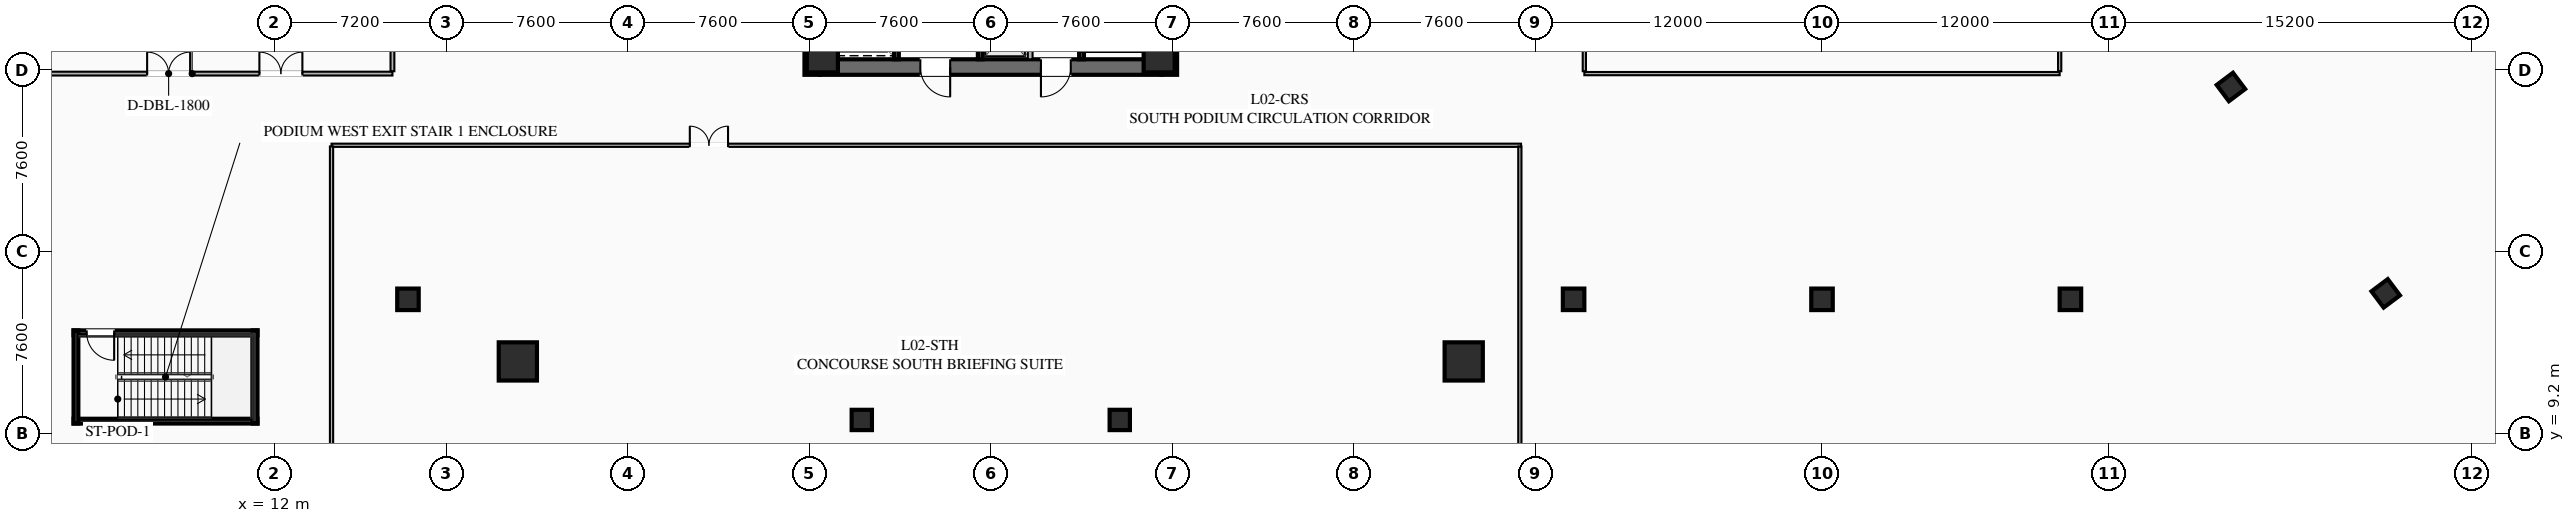
"""IFC4 building model, lengths in metres.
Left out: names, types, materials, properties, quantities, classifications, styles, units other than length and angle.
Written with IfcOpenShell. Run it as: python <this file> out.ifc"""

import sys

from ifc_helpers import new_model, si_unit, direction, frame, frame_2d, origin, origin_2d, place, context, subcontext, project, spatial, rectangle, hollow_rectangle, extrude, element, fill, save


model = new_model("IFC4")
c1 = context("Model", 3, precision=1e-05, world=origin(), true_north=direction((0.0, 1.0)))
c2 = subcontext(c1, "Body", "Model", "MODEL_VIEW")
j1 = project(units=[si_unit("LENGTHUNIT", "METRE"), si_unit("PLANEANGLEUNIT", "RADIAN")], contexts=[c1])
p1 = place(None, origin())
s1 = spatial("IfcSite", under=j1, at=p1, CompositionType="ELEMENT")
p2 = place(p1, origin())
s2 = spatial("IfcBuilding", under=s1, at=p2, CompositionType="ELEMENT")
p3 = place(p2, frame((0.0, 0.0, 10.2)))
s3 = spatial("IfcBuildingStorey", under=s2, at=p3, CompositionType="ELEMENT", Elevation=10.2)
for number, where, z_axis, x_axis in (
    (1, (34.525, 24.2, 0.0), (0.0, 0.0, 1.0), (0.0, 1.0, 0.0)),
    (2, (49.475, 39.8, 0.0), (0.0, 0.0, 1.0), (0.0, -1.0, 0.0)),
):
    element("IfcWall", number, at=place(p3, frame(where, z_axis=z_axis, x_axis=x_axis)), inside=s3, PredefinedType="SHEAR", context=c2, shape_type="SweptSolid", body=[
        extrude(rectangle(XDim=15.6, YDim=0.65, at=frame_2d((7.8, 0.0))), origin(), (0.0, 0.0, 1.0), 5.4),
    ])
p4 = place(p3, frame((49.15, 24.525, 0.0), z_axis=(0.0, 0.0, 1.0), x_axis=(-1.0, 0.0, 0.0)))
e3 = element("IfcWall", 3, at=p4, inside=s3, PredefinedType="SHEAR", context=c2, shape_type="SweptSolid", body=[
    extrude(rectangle(XDim=14.3, YDim=0.65, at=frame_2d((7.15, 0.0))), origin(), (0.0, 0.0, 1.0), 5.4),
])
p5 = place(p4, frame((8.85, 0.0, 0.0)))
e4 = element("IfcOpeningElement", 4, at=p5, cuts=e3, PredefinedType="OPENING", context=c2, shape_type="SweptSolid", body=[
    extrude(rectangle(XDim=1.25, YDim=2.25, at=frame_2d((0.625, 1.125))), frame((0.0, 0.335, 0.0), z_axis=(0.0, -1.0, 0.0), x_axis=(1.0, 0.0, 0.0)), (0.0, 0.0, 1.0), 0.67),
])
p6 = place(p4, frame((3.8, 0.0, 0.0)))
e5 = element("IfcOpeningElement", 5, at=p6, cuts=e3, PredefinedType="OPENING", context=c2, shape_type="SweptSolid", body=[
    extrude(rectangle(XDim=1.25, YDim=2.25, at=frame_2d((0.625, 1.125))), frame((0.0, 0.335, 0.0), z_axis=(0.0, -1.0, 0.0), x_axis=(1.0, 0.0, 0.0)), (0.0, 0.0, 1.0), 0.67),
])
for number, where, z_axis, x_axis in (
    (6, (34.95, 24.95, 0.0), (0.0, 0.0, 1.0), (1.0, 0.0, 0.0)),
    (7, (49.05, 24.95, 0.0), (0.0, 0.0, 1.0), (1.0, 0.0, 0.0)),
):
    element("IfcColumn", number, at=place(p3, frame(where, z_axis=z_axis, x_axis=x_axis)), inside=s3, PredefinedType="COLUMN", context=c2, shape_type="SweptSolid", body=[
        extrude(hollow_rectangle(XDim=1.3, YDim=1.3, WallThickness=0.05, at=origin_2d()), origin(), (0.0, 0.0, 1.0), 5.14),
    ])
for number, where, z_axis, x_axis in (
    (8, (22.2, 12.2, 0.0), (0.0, 0.0, 1.0), (1.0, 0.0, 0.0)),
    (9, (61.8, 12.2, 0.0), (0.0, 0.0, 1.0), (1.0, 0.0, 0.0)),
):
    element("IfcColumn", number, at=place(p3, frame(where, z_axis=z_axis, x_axis=x_axis)), inside=s3, PredefinedType="COLUMN", context=c2, shape_type="SweptSolid", body=[
        extrude(hollow_rectangle(XDim=1.6, YDim=1.6, WallThickness=0.06, at=origin_2d()), origin(), (0.0, 0.0, 1.0), 5.14),
    ])
for number, where, z_axis, x_axis in (
    (10, (36.6, 9.75, 0.0), (0.0, 0.0, 1.0), (1.0, 0.0, 0.0)),
    (11, (47.4, 9.75, 0.0), (0.0, 0.0, 1.0), (1.0, 0.0, 0.0)),
):
    element("IfcColumn", number, at=place(p3, frame(where, z_axis=z_axis, x_axis=x_axis)), inside=s3, PredefinedType="COLUMN", context=c2, shape_type="SweptSolid", body=[
        extrude(hollow_rectangle(XDim=0.85, YDim=0.85, WallThickness=0.035, at=origin_2d()), origin(), (0.0, 0.0, 1.0), 5.14),
    ])
p7 = place(p3, frame((112.476, 21.107, 0.0), z_axis=(0.0, 0.0, 1.0), x_axis=(-0.600005007985, 0.799996243986, 0.0)))
e12 = element("IfcWall", 12, at=p7, inside=s3, PredefinedType="SHEAR", context=c2, shape_type="SweptSolid", body=[
    extrude(rectangle(XDim=15.6, YDim=0.65, at=frame_2d((7.8, 0.0))), origin(), (0.0, 0.0, 1.0), 5.4),
])
for number, where, z_axis, x_axis in (
    (13, (93.92, 23.69, 0.0), (0.0, 0.0, 1.0), (0.8, 0.6, 0.0)),
    (14, (100.4, 15.05, 0.0), (0.0, 0.0, 1.0), (0.8, 0.6, 0.0)),
):
    element("IfcColumn", number, at=place(p3, frame(where, z_axis=z_axis, x_axis=x_axis)), inside=s3, PredefinedType="COLUMN", context=c2, shape_type="SweptSolid", body=[
        extrude(hollow_rectangle(XDim=0.85, YDim=0.85, WallThickness=0.035, at=origin_2d()), origin(), (0.0, 0.0, 1.0), 5.14),
    ])
for number, where, z_axis, x_axis in (
    (15, (17.6, 14.8, 0.0), (0.0, 0.0, 1.0), (1.0, 0.0, 0.0)),
    (16, (66.4, 14.8, 0.0), (0.0, 0.0, 1.0), (1.0, 0.0, 0.0)),
    (17, (76.8, 14.8, 0.0), (0.0, 0.0, 1.0), (1.0, 0.0, 0.0)),
    (18, (87.2, 14.8, 0.0), (0.0, 0.0, 1.0), (1.0, 0.0, 0.0)),
):
    element("IfcColumn", number, at=place(p3, frame(where, z_axis=z_axis, x_axis=x_axis)), inside=s3, PredefinedType="COLUMN", context=c2, shape_type="SweptSolid", body=[
        extrude(rectangle(XDim=0.9, YDim=0.9, at=origin_2d()), origin(), (0.0, 0.0, 1.0), 5.14),
    ])
p8 = place(p3, frame((45.8, 32.8, 0.0), z_axis=(0.0, 0.0, 1.0), x_axis=(0.0, -1.0, 0.0)))
e19 = element("IfcWall", 19, at=p8, inside=s3, PredefinedType="SHEAR", context=c2, shape_type="SweptSolid", body=[
    extrude(rectangle(XDim=7.95, YDim=0.2, at=frame_2d((3.975, 0.0))), origin(), (0.0, 0.0, 1.0), 5.14),
])
p9 = place(p8, frame((0.45, 0.0, 0.0)))
e20 = element("IfcOpeningElement", 20, at=p9, cuts=e19, PredefinedType="OPENING", context=c2, shape_type="SweptSolid", body=[
    extrude(rectangle(XDim=1.15, YDim=2.2, at=frame_2d((0.575, 1.1))), frame((0.0, 0.11, 0.0), z_axis=(0.0, -1.0, 0.0), x_axis=(1.0, 0.0, 0.0)), (0.0, 0.0, 1.0), 0.22),
])
p10 = place(p3, frame((41.56, 24.85, 0.0), z_axis=(0.0, 0.0, 1.0), x_axis=(0.0, 1.0, 0.0)))
e21 = element("IfcWall", 21, at=p10, inside=s3, PredefinedType="SHEAR", context=c2, shape_type="SweptSolid", body=[
    extrude(rectangle(XDim=14.3, YDim=0.2, at=frame_2d((7.15, 0.0))), origin(), (0.0, 0.0, 1.0), 5.14),
])
p11 = place(p3, frame((38.05, 24.85, 0.0), z_axis=(0.0, 0.0, 1.0), x_axis=(0.0, 1.0, 0.0)))
e22 = element("IfcWall", 22, at=p11, inside=s3, PredefinedType="SHEAR", context=c2, shape_type="SweptSolid", body=[
    extrude(rectangle(XDim=6.35, YDim=0.2, at=frame_2d((3.175, 0.0))), origin(), (0.0, 0.0, 1.0), 5.14),
])
p12 = place(p11, frame((4.775, 0.0, 0.0)))
e23 = element("IfcOpeningElement", 23, at=p12, cuts=e22, PredefinedType="OPENING", context=c2, shape_type="SweptSolid", body=[
    extrude(rectangle(XDim=1.3, YDim=2.25, at=frame_2d((0.65, 1.125))), frame((0.0, 0.11, 0.0), z_axis=(0.0, -1.0, 0.0), x_axis=(1.0, 0.0, 0.0)), (0.0, 0.0, 1.0), 0.22),
])
p13 = place(p11, frame((2.775, 0.0, 0.0)))
e24 = element("IfcOpeningElement", 24, at=p13, cuts=e22, PredefinedType="OPENING", context=c2, shape_type="SweptSolid", body=[
    extrude(rectangle(XDim=1.3, YDim=2.25, at=frame_2d((0.65, 1.125))), frame((0.0, 0.11, 0.0), z_axis=(0.0, -1.0, 0.0), x_axis=(1.0, 0.0, 0.0)), (0.0, 0.0, 1.0), 0.22),
])
p14 = place(p11, frame((0.575, 0.0, 0.0)))
e25 = element("IfcOpeningElement", 25, at=p14, cuts=e22, PredefinedType="OPENING", context=c2, shape_type="SweptSolid", body=[
    extrude(rectangle(XDim=1.3, YDim=2.25, at=frame_2d((0.65, 1.125))), frame((0.0, 0.11, 0.0), z_axis=(0.0, -1.0, 0.0), x_axis=(1.0, 0.0, 0.0)), (0.0, 0.0, 1.0), 0.22),
])
p15 = place(p3, frame((43.65, 24.85, 0.0), z_axis=(0.0, 0.0, 1.0), x_axis=(0.0, 1.0, 0.0)))
e26 = element("IfcWall", 26, at=p15, inside=s3, PredefinedType="SOLIDWALL", context=c2, shape_type="SweptSolid", body=[
    extrude(rectangle(XDim=6.8, YDim=0.2, at=frame_2d((3.4, 0.0))), origin(), (0.0, 0.0, 1.0), 5.14),
])
p16 = place(p15, frame((0.625, 0.0, 0.0)))
e27 = element("IfcOpeningElement", 27, at=p16, cuts=e26, PredefinedType="OPENING", context=c2, shape_type="SweptSolid", body=[
    extrude(rectangle(XDim=1.1, YDim=2.2, at=frame_2d((0.55, 1.1))), frame((0.0, 0.11, 0.0), z_axis=(0.0, -1.0, 0.0), x_axis=(1.0, 0.0, 0.0)), (0.0, 0.0, 1.0), 0.22),
])
p17 = place(p15, frame((2.875, 0.0, 0.0)))
e28 = element("IfcOpeningElement", 28, at=p17, cuts=e26, PredefinedType="OPENING", context=c2, shape_type="SweptSolid", body=[
    extrude(rectangle(XDim=1.1, YDim=2.2, at=frame_2d((0.55, 1.1))), frame((0.0, 0.11, 0.0), z_axis=(0.0, -1.0, 0.0), x_axis=(1.0, 0.0, 0.0)), (0.0, 0.0, 1.0), 0.22),
])
p18 = place(p15, frame((5.125, 0.0, 0.0)))
e29 = element("IfcOpeningElement", 29, at=p18, cuts=e26, PredefinedType="OPENING", context=c2, shape_type="SweptSolid", body=[
    extrude(rectangle(XDim=1.1, YDim=2.2, at=frame_2d((0.55, 1.1))), frame((0.0, 0.11, 0.0), z_axis=(0.0, -1.0, 0.0), x_axis=(1.0, 0.0, 0.0)), (0.0, 0.0, 1.0), 0.22),
])
p19 = place(p3, frame((11.3, 13.4, 0.0), z_axis=(0.0, 0.0, 1.0), x_axis=(-1.0, 0.0, 0.0)))
e30 = element("IfcWall", 30, at=p19, inside=s3, PredefinedType="SHEAR", context=c2, shape_type="SweptSolid", body=[
    extrude(rectangle(XDim=7.7, YDim=0.2, at=frame_2d((3.85, 0.0))), origin(), (0.0, 0.0, 1.0), 5.14),
])
p20 = place(p19, frame((6.0, 0.0, 0.0)))
e31 = element("IfcOpeningElement", 31, at=p20, cuts=e30, PredefinedType="OPENING", context=c2, shape_type="SweptSolid", body=[
    extrude(rectangle(XDim=1.15, YDim=2.2, at=frame_2d((0.575, 1.1))), frame((0.0, 0.11, 0.0), z_axis=(0.0, -1.0, 0.0), x_axis=(1.0, 0.0, 0.0)), (0.0, 0.0, 1.0), 0.22),
])
p21 = place(p3, frame((3.6, 9.7, 0.0), z_axis=(0.0, 0.0, 1.0), x_axis=(1.0, 0.0, 0.0)))
e32 = element("IfcWall", 32, at=p21, inside=s3, PredefinedType="SHEAR", context=c2, shape_type="SweptSolid", body=[
    extrude(rectangle(XDim=7.7, YDim=0.2, at=frame_2d((3.85, 0.0))), origin(), (0.0, 0.0, 1.0), 5.14),
])
for number, where, z_axis, x_axis in (
    (33, (3.7, 9.6, 0.0), (0.0, 0.0, 1.0), (0.0, 1.0, 0.0)),
    (34, (11.2, 9.6, 0.0), (0.0, 0.0, 1.0), (0.0, 1.0, 0.0)),
):
    element("IfcWall", number, at=place(p3, frame(where, z_axis=z_axis, x_axis=x_axis)), inside=s3, PredefinedType="SHEAR", context=c2, shape_type="SweptSolid", body=[
        extrude(rectangle(XDim=3.9, YDim=0.2, at=frame_2d((1.95, 0.0))), origin(), (0.0, 0.0, 1.0), 5.14),
    ])
p22 = place(p3, frame((0.18, 24.25, 0.0), z_axis=(0.0, 0.0, 1.0), x_axis=(1.0, 0.0, 0.0)))
e35 = element("IfcWall", 35, at=p22, inside=s3, PredefinedType="PARTITIONING", context=c2, shape_type="SweptSolid", body=[
    extrude(rectangle(XDim=16.77, YDim=0.16, at=frame_2d((8.385, 0.0))), origin(), (0.0, 0.0, 1.0), 2.71),
])
p23 = place(p22, frame((6.5, 0.0, 0.0)))
e36 = element("IfcOpeningElement", 36, at=p23, cuts=e35, PredefinedType="OPENING", context=c2, shape_type="SweptSolid", body=[
    extrude(rectangle(XDim=1.8, YDim=2.4, at=frame_2d((0.9, 1.2))), frame((0.0, 0.09, 0.0), z_axis=(0.0, -1.0, 0.0), x_axis=(1.0, 0.0, 0.0)), (0.0, 0.0, 1.0), 0.18),
])
p24 = place(p22, frame((11.2, 0.0, 0.0)))
e37 = element("IfcOpeningElement", 37, at=p24, cuts=e35, PredefinedType="OPENING", context=c2, shape_type="SweptSolid", body=[
    extrude(rectangle(XDim=1.8, YDim=2.4, at=frame_2d((0.9, 1.2))), frame((0.0, 0.09, 0.0), z_axis=(0.0, -1.0, 0.0), x_axis=(1.0, 0.0, 0.0)), (0.0, 0.0, 1.0), 0.18),
])
p25 = place(p3, frame((16.95, 24.35, 0.0), z_axis=(0.0, 0.0, 1.0), x_axis=(0.0, 1.0, 0.0)))
e38 = element("IfcWall", 38, at=p25, inside=s3, PredefinedType="PARTITIONING", context=c2, shape_type="SweptSolid", body=[
    extrude(rectangle(XDim=15.43, YDim=0.16, at=frame_2d((7.715, 0.0))), origin(), (0.0, 0.0, 1.0), 2.71),
])
p26 = place(p3, frame((66.85, 24.25, 0.0), z_axis=(0.0, 0.0, 1.0), x_axis=(1.0, 0.0, 0.0)))
e39 = element("IfcWall", 39, at=p26, inside=s3, PredefinedType="PARTITIONING", context=c2, shape_type="SweptSolid", body=[
    extrude(rectangle(XDim=19.9, YDim=0.135, at=frame_2d((9.95, 0.0))), origin(), (0.0, 0.0, 1.0), 2.71),
])
for number, where, z_axis, x_axis in (
    (40, (66.85, 24.35, 0.0), (0.0, 0.0, 1.0), (0.0, 1.0, 0.0)),
    (41, (86.75, 24.35, 0.0), (0.0, 0.0, 1.0), (0.0, 1.0, 0.0)),
):
    element("IfcWall", number, at=place(p3, frame(where, z_axis=z_axis, x_axis=x_axis)), inside=s3, PredefinedType="PARTITIONING", context=c2, shape_type="SweptSolid", body=[
        extrude(rectangle(XDim=15.3, YDim=0.135, at=frame_2d((7.65, 0.0))), origin(), (0.0, 0.0, 1.0), 2.71),
    ])
p27 = place(p3, frame((14.4, 21.25, 0.0), z_axis=(0.0, 0.0, 1.0), x_axis=(1.0, 0.0, 0.0)))
e42 = element("IfcWall", 42, at=p27, inside=s3, PredefinedType="PARTITIONING", context=c2, shape_type="SweptSolid", body=[
    extrude(rectangle(XDim=49.8, YDim=0.135, at=frame_2d((24.9, 0.0))), origin(), (0.0, 0.0, 1.0), 2.71),
])
p28 = place(p27, frame((15.0, 0.0, 0.0)))
e43 = element("IfcOpeningElement", 43, at=p28, cuts=e42, PredefinedType="OPENING", context=c2, shape_type="SweptSolid", body=[
    extrude(rectangle(XDim=1.6, YDim=2.25, at=frame_2d((0.8, 1.125))), frame((0.0, 0.077, 0.0), z_axis=(0.0, -1.0, 0.0), x_axis=(1.0, 0.0, 0.0)), (0.0, 0.0, 1.0), 0.155),
])
for number, where, z_axis, x_axis in (
    (44, (14.4, 0.35, 0.0), (0.0, 0.0, 1.0), (0.0, 1.0, 0.0)),
    (45, (64.15, 0.35, 0.0), (0.0, 0.0, 1.0), (0.0, 1.0, 0.0)),
):
    element("IfcWall", number, at=place(p3, frame(where, z_axis=z_axis, x_axis=x_axis)), inside=s3, PredefinedType="PARTITIONING", context=c2, shape_type="SweptSolid", body=[
        extrude(rectangle(XDim=20.85, YDim=0.135, at=frame_2d((10.425, 0.0))), origin(), (0.0, 0.0, 1.0), 2.71),
    ])
p29 = place(p5, origin())
e46 = element("IfcDoor", 46, at=p29, inside=s3, OperationType="SINGLE_SWING_LEFT", PredefinedType="DOOR", context=c2, shape_type="SweptSolid", body=[
    extrude(rectangle(XDim=1.25, YDim=2.25, at=frame_2d((0.625, 1.125))), frame((0.0, 0.025, 0.0), z_axis=(0.0, -1.0, 0.0), x_axis=(1.0, 0.0, 0.0)), (0.0, 0.0, 1.0), 0.05),
])
fill(e4, e46)
p30 = place(p6, origin())
e47 = element("IfcDoor", 47, at=p30, inside=s3, OperationType="SINGLE_SWING_RIGHT", PredefinedType="DOOR", context=c2, shape_type="SweptSolid", body=[
    extrude(rectangle(XDim=1.25, YDim=2.25, at=frame_2d((0.625, 1.125))), frame((0.0, 0.025, 0.0), z_axis=(0.0, -1.0, 0.0), x_axis=(1.0, 0.0, 0.0)), (0.0, 0.0, 1.0), 0.05),
])
fill(e5, e47)
p31 = place(p20, origin())
e48 = element("IfcDoor", 48, at=p31, inside=s3, OperationType="SINGLE_SWING_LEFT", PredefinedType="DOOR", context=c2, shape_type="SweptSolid", body=[
    extrude(rectangle(XDim=1.15, YDim=2.2, at=frame_2d((0.575, 1.1))), frame((0.0, 0.025, 0.0), z_axis=(0.0, -1.0, 0.0), x_axis=(1.0, 0.0, 0.0)), (0.0, 0.0, 1.0), 0.05),
])
fill(e31, e48)
p32 = place(p23, origin())
e49 = element("IfcDoor", 49, at=p32, inside=s3, OperationType="DOUBLE_DOOR_SINGLE_SWING", PredefinedType="DOOR", context=c2, shape_type="SweptSolid", body=[
    extrude(rectangle(XDim=1.8, YDim=2.4, at=frame_2d((0.9, 1.2))), frame((0.0, 0.025, 0.0), z_axis=(0.0, -1.0, 0.0), x_axis=(1.0, 0.0, 0.0)), (0.0, 0.0, 1.0), 0.05),
])
fill(e36, e49)
p33 = place(p24, origin())
e50 = element("IfcDoor", 50, at=p33, inside=s3, OperationType="DOUBLE_DOOR_SINGLE_SWING", PredefinedType="DOOR", context=c2, shape_type="SweptSolid", body=[
    extrude(rectangle(XDim=1.8, YDim=2.4, at=frame_2d((0.9, 1.2))), frame((0.0, 0.025, 0.0), z_axis=(0.0, -1.0, 0.0), x_axis=(1.0, 0.0, 0.0)), (0.0, 0.0, 1.0), 0.05),
])
fill(e37, e50)
p34 = place(p28, origin())
e51 = element("IfcDoor", 51, at=p34, inside=s3, OperationType="DOUBLE_DOOR_SINGLE_SWING", PredefinedType="DOOR", context=c2, shape_type="SweptSolid", body=[
    extrude(rectangle(XDim=1.6, YDim=2.25, at=frame_2d((0.8, 1.125))), frame((0.0, 0.025, 0.0), z_axis=(0.0, -1.0, 0.0), x_axis=(1.0, 0.0, 0.0)), (0.0, 0.0, 1.0), 0.05),
])
fill(e43, e51)
save(model, sys.argv[1])
